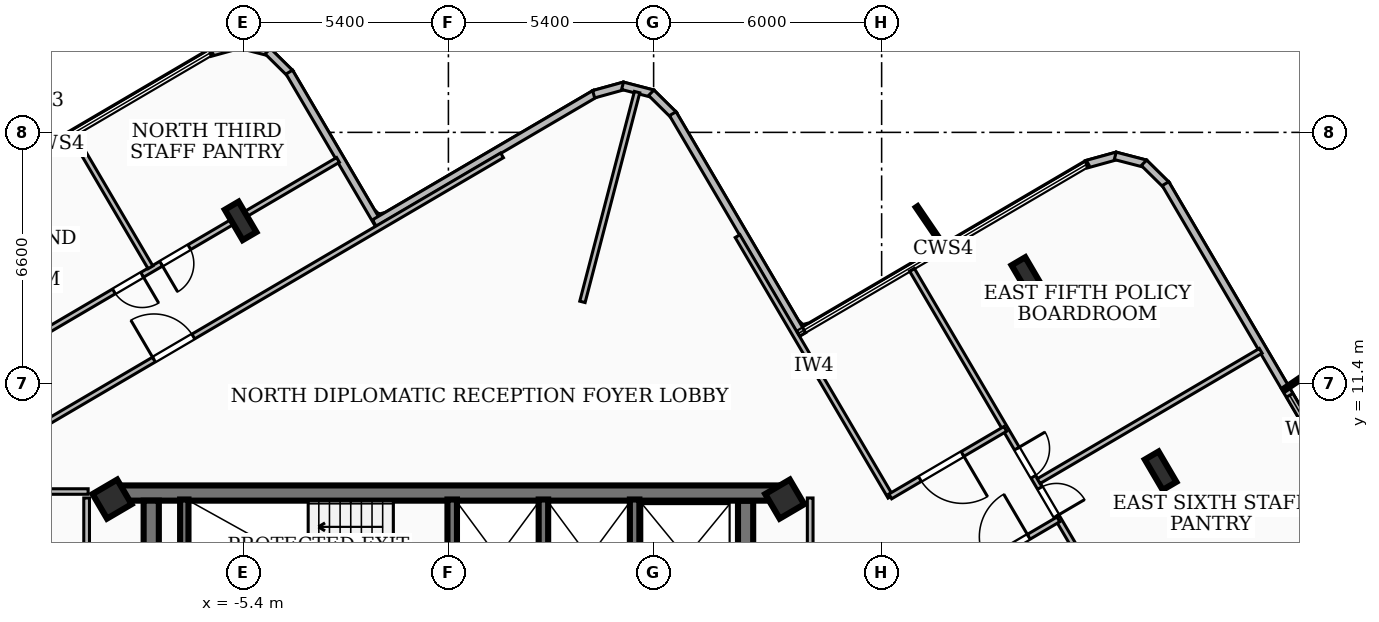
"""IFC4 building model, lengths in metres.
Left out: names, types, materials, properties, quantities, classifications, styles, units other than length and angle.
Written with IfcOpenShell. Run it as: python <this file> out.ifc"""

import sys

from ifc_helpers import new_model, si_unit, direction, frame, frame_2d, origin, origin_2d, place, context, subcontext, project, spatial, rectangle, i_section, extrude, element, fill, save


model = new_model("IFC4")
c1 = context("Model", 3, precision=1e-05, world=origin(), true_north=direction((0.0, 1.0)))
c2 = subcontext(c1, "Body", "Model", "MODEL_VIEW")
j1 = project(units=[si_unit("LENGTHUNIT", "METRE"), si_unit("PLANEANGLEUNIT", "RADIAN")], contexts=[c1])
p1 = place(None, origin())
s1 = spatial("IfcSite", under=j1, at=p1, CompositionType="ELEMENT")
p2 = place(p1, origin())
s2 = spatial("IfcBuilding", under=s1, at=p2, CompositionType="ELEMENT")
p3 = place(p2, frame((0.0, 0.0, 212.04)))
s3 = spatial("IfcBuildingStorey", under=s2, at=p3, CompositionType="ELEMENT", Elevation=212.04)
p4 = place(p3, frame((-8.78, 8.51, 0.0), z_axis=(0.0, 0.0, 1.0), x_axis=(1.0, 0.0, 0.0)))
e1 = element("IfcWall", 1, at=p4, inside=s3, PredefinedType="SHEAR", context=c2, shape_type="SweptSolid", body=[
    extrude(rectangle(XDim=17.56, YDim=0.4, at=frame_2d((8.78, 0.0))), origin(), (0.0, 0.0, 1.0), 3.16),
])
for number, where, z_axis, x_axis in (
    (2, (-7.82, 1.95, 0.0), (0.0, 0.0, 1.0), (0.0, 1.0, 0.0)),
    (3, (7.82, 8.31, 0.0), (0.0, 0.0, 1.0), (0.0, -1.0, 0.0)),
):
    element("IfcWall", number, at=place(p3, frame(where, z_axis=z_axis, x_axis=x_axis)), inside=s3, PredefinedType="SHEAR", context=c2, shape_type="SweptSolid", body=[
        extrude(rectangle(XDim=6.36, YDim=0.4, at=frame_2d((3.18, 0.0))), origin(), (0.0, 0.0, 1.0), 3.16),
    ])
p5 = place(p3, frame((-6.95, 5.28, 0.0), z_axis=(0.0, 0.0, 1.0), x_axis=(0.0, 1.0, 0.0)))
e4 = element("IfcWall", 4, at=p5, inside=s3, PredefinedType="SOLIDWALL", context=c2, shape_type="SweptSolid", body=[
    extrude(rectangle(XDim=3.06, YDim=0.22, at=frame_2d((1.53, 0.0))), origin(), (0.0, 0.0, 1.0), 3.16),
])
for number, where, z_axis, x_axis in (
    (5, (0.1, 5.3, 0.0), (0.0, 0.0, 1.0), (0.0, 1.0, 0.0)),
    (6, (2.5, 5.3, 0.0), (0.0, 0.0, 1.0), (0.0, 1.0, 0.0)),
    (7, (4.9, 5.3, 0.0), (0.0, 0.0, 1.0), (0.0, 1.0, 0.0)),
):
    element("IfcWall", number, at=place(p3, frame(where, z_axis=z_axis, x_axis=x_axis)), inside=s3, PredefinedType="SOLIDWALL", context=c2, shape_type="SweptSolid", body=[
        extrude(rectangle(XDim=3.04, YDim=0.25, at=frame_2d((1.52, 0.0))), origin(), (0.0, 0.0, 1.0), 3.16),
    ])
for number, where, z_axis, x_axis in (
    (8, (-8.85, 8.35, 0.0), (0.0, 0.0, 1.0), (0.863, 0.506, 0.0)),
    (9, (8.85, 8.35, 0.0), (0.0, 0.0, 1.0), (0.863, 0.506, 0.0)),
):
    element("IfcColumn", number, at=place(p3, frame(where, z_axis=z_axis, x_axis=x_axis)), inside=s3, PredefinedType="COLUMN", context=c2, shape_type="SweptSolid", body=[
        extrude(rectangle(XDim=0.75, YDim=0.75, at=origin_2d()), origin(), (0.0, 0.0, 1.0), 3.42),
    ])
for number, where, z_axis, x_axis in (
    (10, (18.741, 9.097, 0.0), (0.0, 0.0, 1.0), (0.863, 0.506, 0.0)),
    (11, (15.234, 14.209, 0.0), (0.0, 0.0, 1.0), (0.863, 0.506, 0.0)),
    (12, (-5.468, 15.671, 0.0), (0.0, 0.0, 1.0), (0.863, 0.506, 0.0)),
):
    element("IfcColumn", number, at=place(p3, frame(where, z_axis=z_axis, x_axis=x_axis)), inside=s3, PredefinedType="COLUMN", context=c2, shape_type="SweptSolid", body=[
        extrude(i_section(OverallWidth=0.418, OverallDepth=0.927, WebThickness=0.019, FlangeThickness=0.032, at=origin_2d()), origin(), (0.0, 0.0, 1.0), 3.42),
    ])
p6 = place(p3, frame((-6.269, 20.097, 0.0), z_axis=(0.0, 0.0, 1.0), x_axis=(0.963925656212, 0.266171616247, 0.0)))
e13 = element("IfcWall", 13, at=p6, inside=s3, PredefinedType="SOLIDWALL", context=c2, shape_type="SweptSolid", body=[
    extrude(rectangle(XDim=0.838, YDim=0.2, at=frame_2d((0.419, 0.0))), origin(), (0.0, 0.0, 1.0), 3.16),
])
p7 = place(p3, frame((-5.509, 20.319, 0.0), z_axis=(0.0, 0.0, 1.0), x_axis=(0.967962254737, -0.251095745493, 0.0)))
e14 = element("IfcWall", 14, at=p7, inside=s3, PredefinedType="SOLIDWALL", context=c2, shape_type="SweptSolid", body=[
    extrude(rectangle(XDim=0.824, YDim=0.2, at=frame_2d((0.412, 0.0))), origin(), (0.0, 0.0, 1.0), 3.16),
])
p8 = place(p3, frame((-4.753, 20.136, 0.0), z_axis=(0.0, 0.0, 1.0), x_axis=(0.711167178618, -0.70302293281, 0.0)))
e15 = element("IfcWall", 15, at=p8, inside=s3, PredefinedType="SOLIDWALL", context=c2, shape_type="SweptSolid", body=[
    extrude(rectangle(XDim=0.839, YDim=0.2, at=frame_2d((0.42, 0.0))), origin(), (0.0, 0.0, 1.0), 3.16),
])
p9 = place(p3, frame((-4.187, 19.586, 0.0), z_axis=(0.0, 0.0, 1.0), x_axis=(0.505936854923, -0.862570518178, 0.0)))
e16 = element("IfcWall", 16, at=p9, inside=s3, PredefinedType="SOLIDWALL", context=c2, shape_type="SweptSolid", body=[
    extrude(rectangle(XDim=4.641, YDim=0.2, at=frame_2d((2.32, 0.0))), origin(), (0.0, 0.0, 1.0), 3.16),
])
p10 = place(p3, frame((-1.948, 15.612, 0.0), z_axis=(0.0, 0.0, 1.0), x_axis=(0.86259717351, 0.505891407569, 0.0)))
e17 = element("IfcWall", 17, at=p10, inside=s3, PredefinedType="SOLIDWALL", context=c2, shape_type="SweptSolid", body=[
    extrude(rectangle(XDim=6.742, YDim=0.2, at=frame_2d((3.371, 0.0))), origin(), (0.0, 0.0, 1.0), 3.16),
])
p11 = place(p3, frame((3.822, 19.003, 0.0), z_axis=(0.0, 0.0, 1.0), x_axis=(0.963905015631, 0.266246353668, 0.0)))
e18 = element("IfcWall", 18, at=p11, inside=s3, PredefinedType="SOLIDWALL", context=c2, shape_type="SweptSolid", body=[
    extrude(rectangle(XDim=0.838, YDim=0.2, at=frame_2d((0.419, 0.0))), origin(), (0.0, 0.0, 1.0), 3.16),
])
p12 = place(p3, frame((4.582, 19.225, 0.0), z_axis=(0.0, 0.0, 1.0), x_axis=(0.967943577658, -0.251167733737, 0.0)))
e19 = element("IfcWall", 19, at=p12, inside=s3, PredefinedType="SOLIDWALL", context=c2, shape_type="SweptSolid", body=[
    extrude(rectangle(XDim=0.824, YDim=0.2, at=frame_2d((0.412, 0.0))), origin(), (0.0, 0.0, 1.0), 3.16),
])
p13 = place(p3, frame((5.338, 19.042, 0.0), z_axis=(0.0, 0.0, 1.0), x_axis=(0.711310891957, -0.702877524881, 0.0)))
e20 = element("IfcWall", 20, at=p13, inside=s3, PredefinedType="SOLIDWALL", context=c2, shape_type="SweptSolid", body=[
    extrude(rectangle(XDim=0.84, YDim=0.2, at=frame_2d((0.42, 0.0))), origin(), (0.0, 0.0, 1.0), 3.16),
])
p14 = place(p3, frame((5.904, 18.492, 0.0), z_axis=(0.0, 0.0, 1.0), x_axis=(0.506017844805, -0.862523008817, 0.0)))
e21 = element("IfcWall", 21, at=p14, inside=s3, PredefinedType="SOLIDWALL", context=c2, shape_type="SweptSolid", body=[
    extrude(rectangle(XDim=6.741, YDim=0.2, at=frame_2d((3.37, 0.0))), origin(), (0.0, 0.0, 1.0), 3.16),
])
p15 = place(p3, frame((16.787, 17.16, 0.0), z_axis=(0.0, 0.0, 1.0), x_axis=(0.963905015631, 0.266246353668, 0.0)))
e22 = element("IfcWall", 22, at=p15, inside=s3, PredefinedType="SOLIDWALL", context=c2, shape_type="SweptSolid", body=[
    extrude(rectangle(XDim=0.838, YDim=0.2, at=frame_2d((0.419, 0.0))), origin(), (0.0, 0.0, 1.0), 3.16),
])
p16 = place(p3, frame((17.547, 17.382, 0.0), z_axis=(0.0, 0.0, 1.0), x_axis=(0.967943577658, -0.251167733737, 0.0)))
e23 = element("IfcWall", 23, at=p16, inside=s3, PredefinedType="SOLIDWALL", context=c2, shape_type="SweptSolid", body=[
    extrude(rectangle(XDim=0.824, YDim=0.2, at=frame_2d((0.412, 0.0))), origin(), (0.0, 0.0, 1.0), 3.16),
])
p17 = place(p3, frame((18.303, 17.199, 0.0), z_axis=(0.0, 0.0, 1.0), x_axis=(0.711894657832, -0.702286263677, 0.0)))
e24 = element("IfcWall", 24, at=p17, inside=s3, PredefinedType="SOLIDWALL", context=c2, shape_type="SweptSolid", body=[
    extrude(rectangle(XDim=0.838, YDim=0.2, at=frame_2d((0.419, 0.0))), origin(), (0.0, 0.0, 1.0), 3.16),
])
p18 = place(p3, frame((18.869, 16.65, 0.0), z_axis=(0.0, 0.0, 1.0), x_axis=(0.505984418435, -0.862542618252, 0.0)))
e25 = element("IfcWall", 25, at=p18, inside=s3, PredefinedType="SOLIDWALL", context=c2, shape_type="SweptSolid", body=[
    extrude(rectangle(XDim=9.625, YDim=0.2, at=frame_2d((4.812, 0.0))), origin(), (0.0, 0.0, 1.0), 3.16),
])
p19 = place(p18, frame((6.457, 0.0, 0.85)))
e26 = element("IfcOpeningElement", 26, at=p19, cuts=e25, PredefinedType="OPENING", context=c2, shape_type="SweptSolid", body=[
    extrude(rectangle(XDim=2.1, YDim=1.8, at=frame_2d((1.05, 0.9))), frame((0.0, 0.11, 0.0), z_axis=(0.0, -1.0, 0.0), x_axis=(1.0, 0.0, 0.0)), (0.0, 0.0, 1.0), 0.22),
])
p20 = place(p3, frame((-9.52, 1.75, 0.0), z_axis=(0.0, 0.0, 1.0), x_axis=(0.0, 1.0, 0.0)))
e27 = element("IfcWall", 27, at=p20, inside=s3, PredefinedType="PARTITIONING", context=c2, shape_type="SweptSolid", body=[
    extrude(rectangle(XDim=6.63, YDim=0.15, at=frame_2d((3.315, 0.0))), origin(), (0.0, 0.0, 1.0), 3.16),
])
p21 = place(p3, frame((9.52, 1.75, 0.0), z_axis=(0.0, 0.0, 1.0), x_axis=(0.0, 1.0, 0.0)))
e28 = element("IfcWall", 28, at=p21, inside=s3, PredefinedType="PARTITIONING", context=c2, shape_type="SweptSolid", body=[
    extrude(rectangle(XDim=6.63, YDim=0.15, at=frame_2d((3.315, 0.0))), origin(), (0.0, 0.0, 1.0), 2.53),
])
p22 = place(p3, frame((-13.854, 8.55, 0.0), z_axis=(0.0, 0.0, 1.0), x_axis=(1.0, 0.0, 0.0)))
e29 = element("IfcWall", 29, at=p22, inside=s3, PredefinedType="PARTITIONING", context=c2, shape_type="SweptSolid", body=[
    extrude(rectangle(XDim=4.374, YDim=0.145, at=frame_2d((2.187, 0.0))), origin(), (0.0, 0.0, 1.0), 2.53),
])
p23 = place(p3, frame((3.527, 13.54, 0.0), z_axis=(0.0, 0.0, 1.0), x_axis=(0.252132617321, 0.967692690519, 0.0)))
e30 = element("IfcWall", 30, at=p23, inside=s3, PredefinedType="PARTITIONING", context=c2, shape_type="SweptSolid", body=[
    extrude(rectangle(XDim=5.703, YDim=0.145, at=frame_2d((2.852, 0.0))), origin(), (0.0, 0.0, 1.0), 3.16),
])
p24 = place(p3, frame((11.632, 8.413, 0.0), z_axis=(0.0, 0.0, 1.0), x_axis=(-0.506057561451, 0.862499706955, 0.0)))
e31 = element("IfcWall", 31, at=p24, inside=s3, PredefinedType="PARTITIONING", context=c2, shape_type="SweptSolid", body=[
    extrude(rectangle(XDim=7.95, YDim=0.145, at=frame_2d((3.975, 0.0))), origin(), (0.0, 0.0, 1.0), 2.53),
])
p25 = place(p3, frame((14.654, 10.198, 0.0), z_axis=(0.0, 0.0, 1.0), x_axis=(-0.862375516706, -0.506269165747, 0.0)))
e32 = element("IfcWall", 32, at=p25, inside=s3, PredefinedType="PARTITIONING", context=c2, shape_type="SweptSolid", body=[
    extrude(rectangle(XDim=3.51, YDim=0.145, at=frame_2d((1.755, 0.0))), origin(), (0.0, 0.0, 1.0), 2.53),
])
p26 = place(p25, frame((1.305, 0.0, 0.0)))
e33 = element("IfcOpeningElement", 33, at=p26, cuts=e32, PredefinedType="OPENING", context=c2, shape_type="SweptSolid", body=[
    extrude(rectangle(XDim=1.3, YDim=2.1, at=frame_2d((0.65, 1.05))), frame((0.0, 0.083, 0.0), z_axis=(0.0, -1.0, 0.0), x_axis=(1.0, 0.0, 0.0)), (0.0, 0.0, 1.0), 0.165),
])
p27 = place(p3, frame((13.024, 6.041, 0.0), z_axis=(0.0, 0.0, 1.0), x_axis=(0.862527334663, 0.506010471195, 0.0)))
e34 = element("IfcWall", 34, at=p27, inside=s3, PredefinedType="PARTITIONING", context=c2, shape_type="SweptSolid", body=[
    extrude(rectangle(XDim=3.51, YDim=0.145, at=frame_2d((1.755, 0.0))), origin(), (0.0, 0.0, 1.0), 3.16),
])
p28 = place(p27, frame((1.305, 0.0, 0.0)))
e35 = element("IfcOpeningElement", 35, at=p28, cuts=e34, PredefinedType="OPENING", context=c2, shape_type="SweptSolid", body=[
    extrude(rectangle(XDim=1.3, YDim=2.1, at=frame_2d((0.65, 1.05))), frame((0.0, 0.083, 0.0), z_axis=(0.0, -1.0, 0.0), x_axis=(1.0, 0.0, 0.0)), (0.0, 0.0, 1.0), 0.165),
])
p29 = place(p3, frame((15.531, 8.822, 0.0), z_axis=(0.0, 0.0, 1.0), x_axis=(0.862494081005, 0.506067149923, 0.0)))
e36 = element("IfcWall", 36, at=p29, inside=s3, PredefinedType="PARTITIONING", context=c2, shape_type="SweptSolid", body=[
    extrude(rectangle(XDim=6.776, YDim=0.145, at=frame_2d((3.388, 0.0))), origin(), (0.0, 0.0, 1.0), 2.53),
])
p30 = place(p3, frame((12.198, 14.385, 0.0), z_axis=(0.0, 0.0, 1.0), x_axis=(0.506037527975, -0.862511460956, 0.0)))
e37 = element("IfcWall", 37, at=p30, inside=s3, PredefinedType="PARTITIONING", context=c2, shape_type="SweptSolid", body=[
    extrude(rectangle(XDim=12.469, YDim=0.145, at=frame_2d((6.235, 0.0))), origin(), (0.0, 0.0, 1.0), 2.53),
])
p31 = place(p30, frame((6.655, 0.0, 0.0)))
e38 = element("IfcOpeningElement", 38, at=p31, cuts=e37, PredefinedType="OPENING", context=c2, shape_type="SweptSolid", body=[
    extrude(rectangle(XDim=0.86, YDim=2.04, at=frame_2d((0.43, 1.02))), frame((0.0, 0.083, 0.0), z_axis=(0.0, -1.0, 0.0), x_axis=(1.0, 0.0, 0.0)), (0.0, 0.0, 1.0), 0.165),
])
p32 = place(p30, frame((5.455, 0.0, 0.0)))
e39 = element("IfcOpeningElement", 39, at=p32, cuts=e37, PredefinedType="OPENING", context=c2, shape_type="SweptSolid", body=[
    extrude(rectangle(XDim=0.86, YDim=2.04, at=frame_2d((0.43, 1.02))), frame((0.0, 0.083, 0.0), z_axis=(0.0, -1.0, 0.0), x_axis=(1.0, 0.0, 0.0)), (0.0, 0.0, 1.0), 0.165),
])
p33 = place(p3, frame((-15.873, 7.255, 0.0), z_axis=(0.0, 0.0, 1.0), x_axis=(0.862498672631, 0.506059324299, 0.0)))
e40 = element("IfcWall", 40, at=p33, inside=s3, PredefinedType="PARTITIONING", context=c2, shape_type="SweptSolid", body=[
    extrude(rectangle(XDim=20.039, YDim=0.145, at=frame_2d((10.02, 0.0))), origin(), (0.0, 0.0, 1.0), 2.53),
])
p34 = place(p33, frame((9.42, 0.0, 0.0)))
e41 = element("IfcOpeningElement", 41, at=p34, cuts=e40, PredefinedType="OPENING", context=c2, shape_type="SweptSolid", body=[
    extrude(rectangle(XDim=1.2, YDim=2.1, at=frame_2d((0.6, 1.05))), frame((0.0, 0.083, 0.0), z_axis=(0.0, -1.0, 0.0), x_axis=(1.0, 0.0, 0.0)), (0.0, 0.0, 1.0), 0.165),
])
p35 = place(p3, frame((-7.84, 14.449, 0.0), z_axis=(0.0, 0.0, 1.0), x_axis=(-0.505991637753, 0.862538383218, 0.0)))
e42 = element("IfcWall", 42, at=p35, inside=s3, PredefinedType="PARTITIONING", context=c2, shape_type="SweptSolid", body=[
    extrude(rectangle(XDim=4.006, YDim=0.145, at=frame_2d((2.003, 0.0))), origin(), (0.0, 0.0, 1.0), 3.16),
])
p36 = place(p3, frame((-2.906, 17.275, 0.0), z_axis=(0.0, 0.0, 1.0), x_axis=(-0.862505879614, -0.506047040927, 0.0)))
e43 = element("IfcWall", 43, at=p36, inside=s3, PredefinedType="PARTITIONING", context=c2, shape_type="SweptSolid", body=[
    extrude(rectangle(XDim=12.471, YDim=0.145, at=frame_2d((6.235, 0.0))), origin(), (0.0, 0.0, 1.0), 2.53),
])
p37 = place(p36, frame((4.535, 0.0, 0.0)))
e44 = element("IfcOpeningElement", 44, at=p37, cuts=e43, PredefinedType="OPENING", context=c2, shape_type="SweptSolid", body=[
    extrude(rectangle(XDim=0.86, YDim=2.04, at=frame_2d((0.43, 1.02))), frame((0.0, 0.083, 0.0), z_axis=(0.0, -1.0, 0.0), x_axis=(1.0, 0.0, 0.0)), (0.0, 0.0, 1.0), 0.165),
])
p38 = place(p36, frame((5.975, 0.0, 0.0)))
e45 = element("IfcOpeningElement", 45, at=p38, cuts=e43, PredefinedType="OPENING", context=c2, shape_type="SweptSolid", body=[
    extrude(rectangle(XDim=0.86, YDim=2.04, at=frame_2d((0.43, 1.02))), frame((0.0, 0.083, 0.0), z_axis=(0.0, -1.0, 0.0), x_axis=(1.0, 0.0, 0.0)), (0.0, 0.0, 1.0), 0.165),
])
p39 = place(p19, origin())
e46 = element("IfcWindow", 46, at=p39, inside=s3, PartitioningType="SINGLE_PANEL", PredefinedType="WINDOW", context=c2, shape_type="SweptSolid", body=[
    extrude(rectangle(XDim=2.1, YDim=1.8, at=frame_2d((1.05, 0.9))), frame((0.0, 0.03, 0.0), z_axis=(0.0, -1.0, 0.0), x_axis=(1.0, 0.0, 0.0)), (0.0, 0.0, 1.0), 0.06),
])
fill(e26, e46)
p40 = place(p26, origin())
e47 = element("IfcDoor", 47, at=p40, inside=s3, OperationType="SINGLE_SWING_LEFT", PredefinedType="DOOR", context=c2, shape_type="SweptSolid", body=[
    extrude(rectangle(XDim=1.3, YDim=2.1, at=frame_2d((0.65, 1.05))), frame((0.0, 0.025, 0.0), z_axis=(0.0, -1.0, 0.0), x_axis=(1.0, 0.0, 0.0)), (0.0, 0.0, 1.0), 0.05),
])
fill(e33, e47)
p41 = place(p28, origin())
e48 = element("IfcDoor", 48, at=p41, inside=s3, OperationType="SINGLE_SWING_RIGHT", PredefinedType="DOOR", context=c2, shape_type="SweptSolid", body=[
    extrude(rectangle(XDim=1.3, YDim=2.1, at=frame_2d((0.65, 1.05))), frame((0.0, 0.025, 0.0), z_axis=(0.0, -1.0, 0.0), x_axis=(1.0, 0.0, 0.0)), (0.0, 0.0, 1.0), 0.05),
])
fill(e35, e48)
p42 = place(p31, origin())
e49 = element("IfcDoor", 49, at=p42, inside=s3, OperationType="SINGLE_SWING_RIGHT", PredefinedType="DOOR", context=c2, shape_type="SweptSolid", body=[
    extrude(rectangle(XDim=0.86, YDim=2.04, at=frame_2d((0.43, 1.02))), frame((0.0, 0.025, 0.0), z_axis=(0.0, -1.0, 0.0), x_axis=(1.0, 0.0, 0.0)), (0.0, 0.0, 1.0), 0.05),
])
fill(e38, e49)
p43 = place(p32, origin())
e50 = element("IfcDoor", 50, at=p43, inside=s3, OperationType="SINGLE_SWING_LEFT", PredefinedType="DOOR", context=c2, shape_type="SweptSolid", body=[
    extrude(rectangle(XDim=0.86, YDim=2.04, at=frame_2d((0.43, 1.02))), frame((0.0, 0.025, 0.0), z_axis=(0.0, -1.0, 0.0), x_axis=(1.0, 0.0, 0.0)), (0.0, 0.0, 1.0), 0.05),
])
fill(e39, e50)
p44 = place(p34, origin())
e51 = element("IfcDoor", 51, at=p44, inside=s3, OperationType="SINGLE_SWING_LEFT", PredefinedType="DOOR", context=c2, shape_type="SweptSolid", body=[
    extrude(rectangle(XDim=1.2, YDim=2.1, at=frame_2d((0.6, 1.05))), frame((0.0, 0.025, 0.0), z_axis=(0.0, -1.0, 0.0), x_axis=(1.0, 0.0, 0.0)), (0.0, 0.0, 1.0), 0.05),
])
fill(e41, e51)
p45 = place(p37, origin())
e52 = element("IfcDoor", 52, at=p45, inside=s3, OperationType="SINGLE_SWING_RIGHT", PredefinedType="DOOR", context=c2, shape_type="SweptSolid", body=[
    extrude(rectangle(XDim=0.86, YDim=2.04, at=frame_2d((0.43, 1.02))), frame((0.0, 0.025, 0.0), z_axis=(0.0, -1.0, 0.0), x_axis=(1.0, 0.0, 0.0)), (0.0, 0.0, 1.0), 0.05),
])
fill(e44, e52)
p46 = place(p38, origin())
e53 = element("IfcDoor", 53, at=p46, inside=s3, OperationType="SINGLE_SWING_LEFT", PredefinedType="DOOR", context=c2, shape_type="SweptSolid", body=[
    extrude(rectangle(XDim=0.86, YDim=2.04, at=frame_2d((0.43, 1.02))), frame((0.0, 0.025, 0.0), z_axis=(0.0, -1.0, 0.0), x_axis=(1.0, 0.0, 0.0)), (0.0, 0.0, 1.0), 0.05),
])
fill(e45, e53)
save(model, sys.argv[1])
